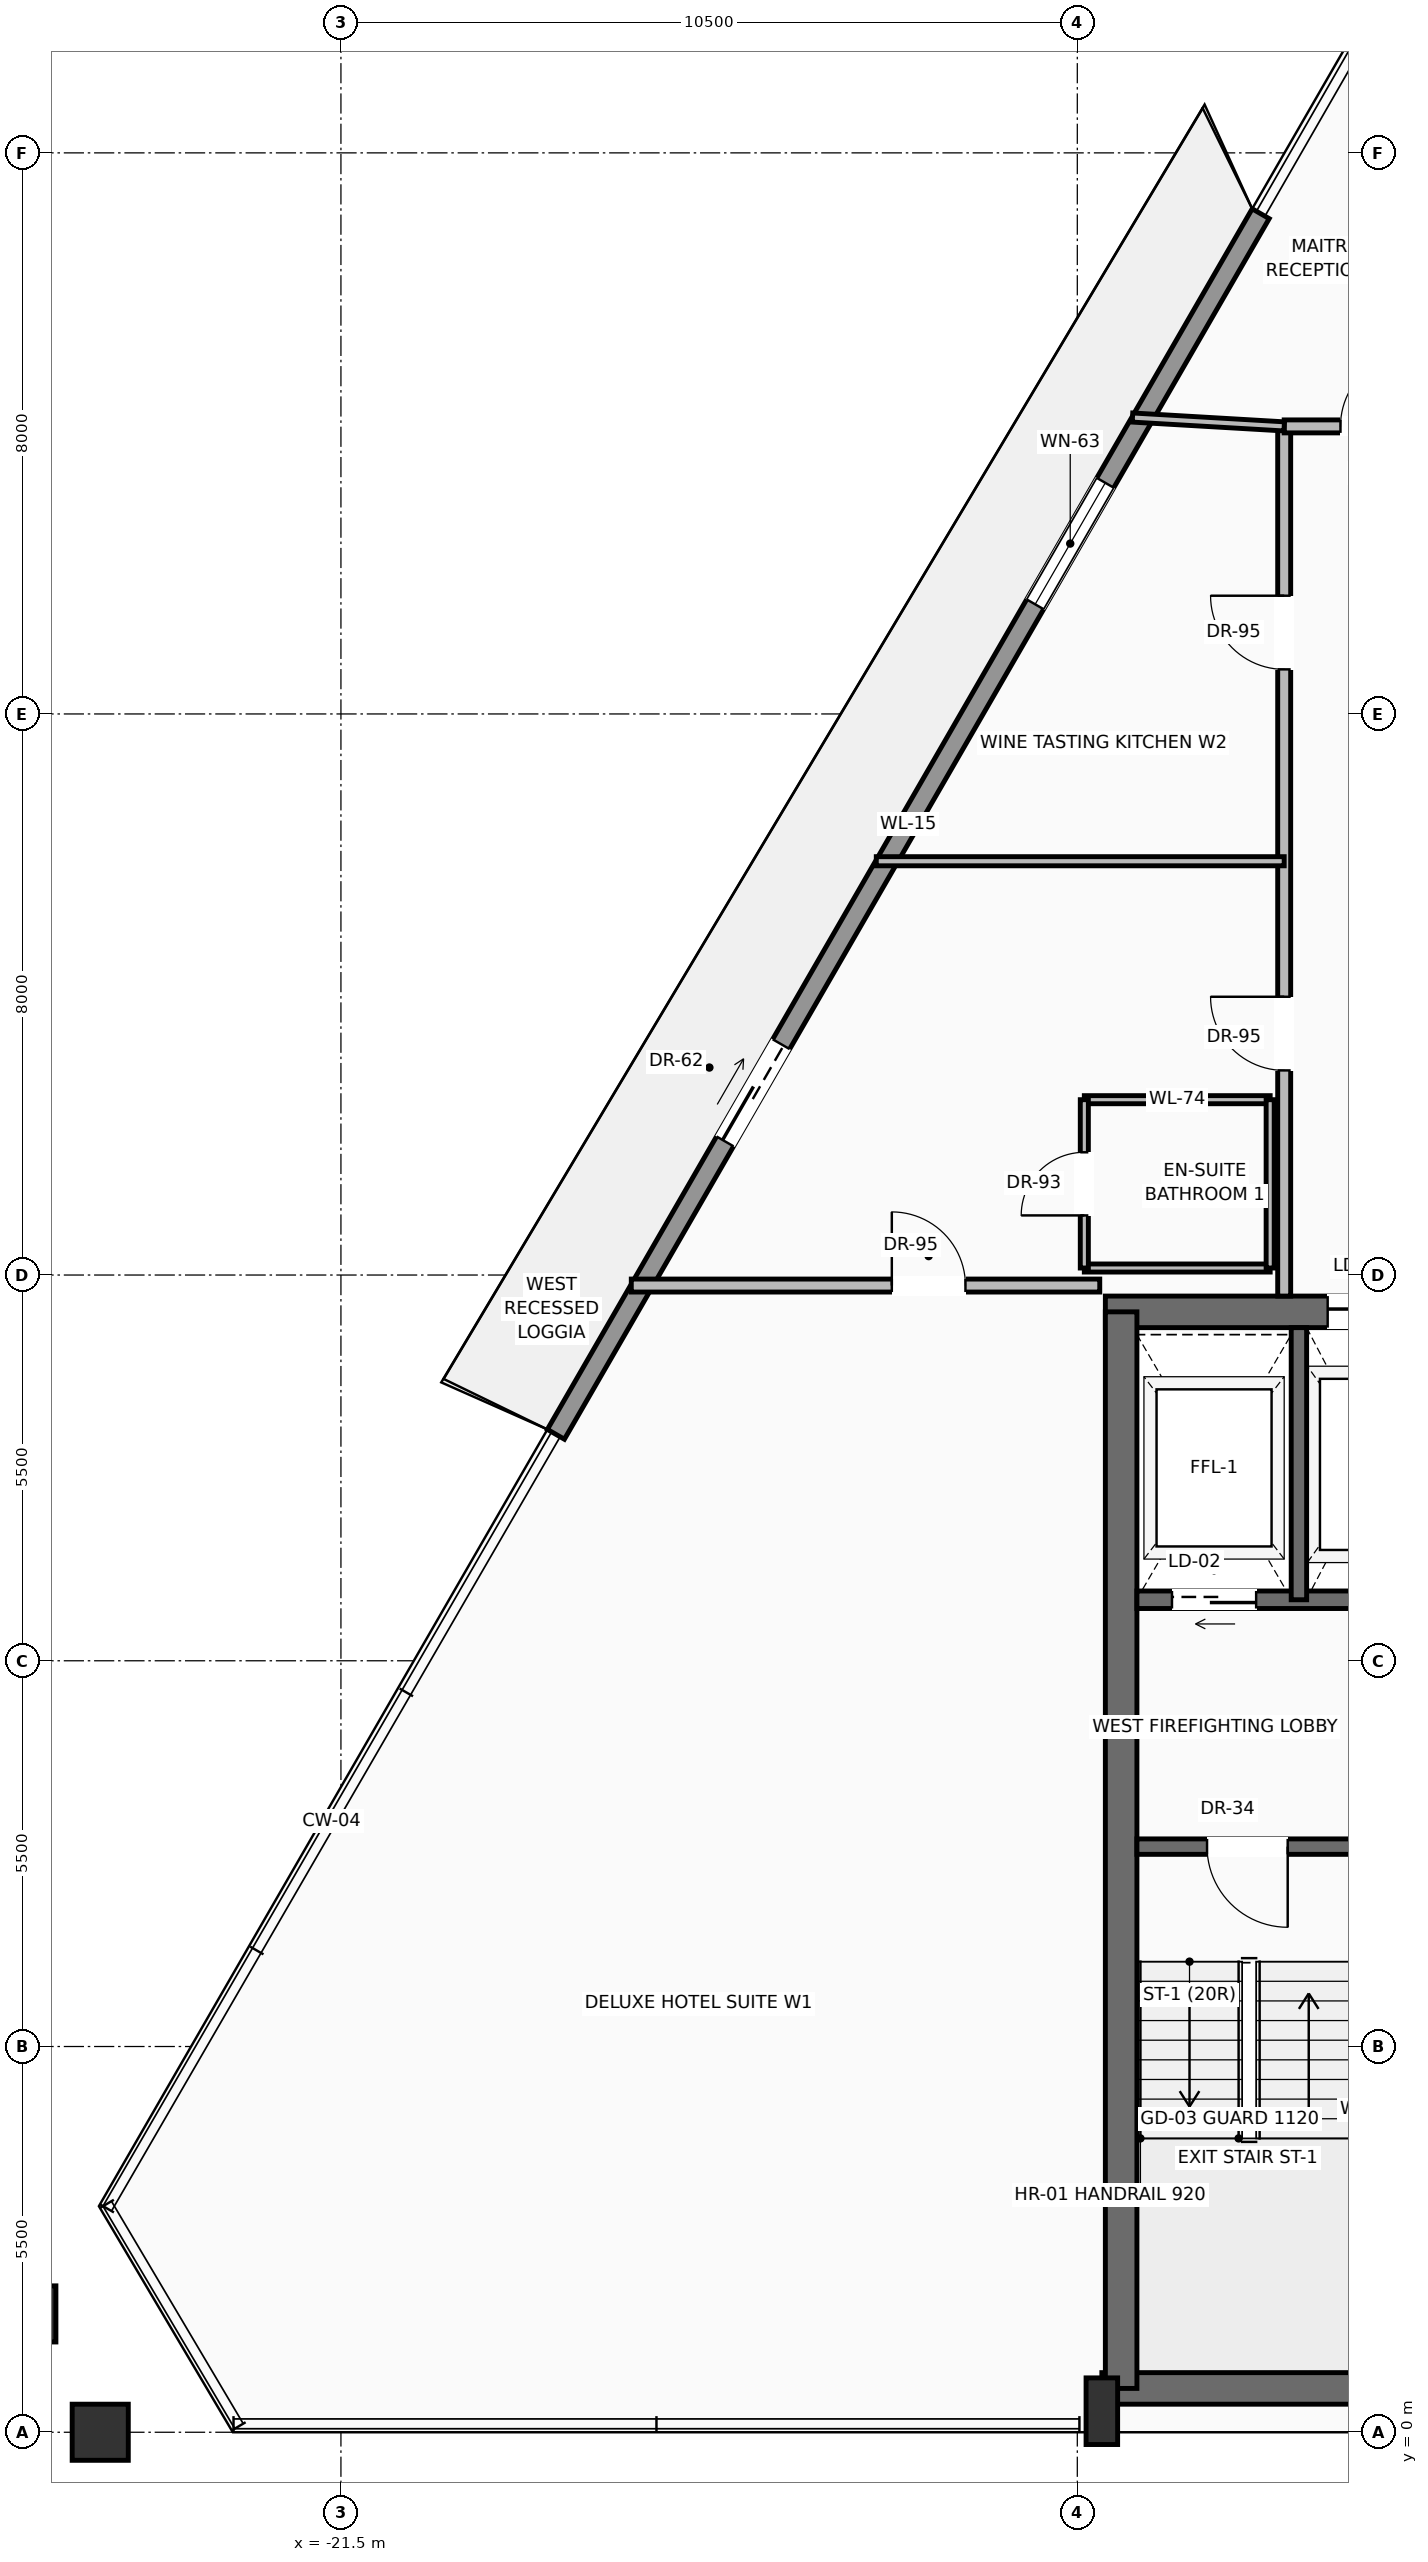
"""IFC4 building model, lengths in metres.
Left out: names, types, materials, properties, quantities, classifications, styles, units other than length and angle.
Written with IfcOpenShell. Run it as: python <this file> out.ifc"""

import sys

from ifc_helpers import new_model, si_unit, direction, frame, frame_2d, origin, origin_2d, place, context, subcontext, project, spatial, rectangle, hollow_rectangle, extrude, source, transform, mapped, element, fill, save


model = new_model("IFC4")
c1 = context("Model", 3, precision=1e-05, world=origin(), true_north=direction((0.0, 1.0)))
c2 = subcontext(c1, "Body", "Model", "MODEL_VIEW")
j1 = project(units=[si_unit("LENGTHUNIT", "METRE"), si_unit("PLANEANGLEUNIT", "RADIAN")], contexts=[c1])
p1 = place(None, origin())
s1 = spatial("IfcSite", under=j1, at=p1, CompositionType="ELEMENT")
p2 = place(p1, origin())
s2 = spatial("IfcBuilding", under=s1, at=p2, CompositionType="ELEMENT")
p3 = place(p2, frame((0.0, 0.0, 276.45)))
s3 = spatial("IfcBuildingStorey", under=s2, at=p3, CompositionType="ELEMENT", Elevation=276.45)
p4 = place(p3, frame((-10.65, 0.625, 0.0), z_axis=(0.0, 0.0, 1.0), x_axis=(1.0, 0.0, 0.0)))
e1 = element("IfcWall", 1, at=p4, inside=s3, PredefinedType="SHEAR", context=c2, shape_type="SweptSolid", body=[
    extrude(rectangle(XDim=21.3, YDim=0.45, at=frame_2d((10.65, 0.0))), origin(), (0.0, 0.0, 1.0), 3.24),
])
p5 = place(p3, frame((-10.6, 15.975, 0.0), z_axis=(0.0, 0.0, 1.0), x_axis=(1.0, 0.0, 0.0)))
e2 = element("IfcWall", 2, at=p5, inside=s3, PredefinedType="SHEAR", context=c2, shape_type="SweptSolid", body=[
    extrude(rectangle(XDim=21.2, YDim=0.45, at=frame_2d((10.6, 0.0))), origin(), (0.0, 0.0, 1.0), 3.24),
])
p6 = place(p5, frame((3.17, 0.0, 0.0)))
e3 = element("IfcOpeningElement", 3, at=p6, cuts=e2, PredefinedType="OPENING", context=c2, shape_type="SweptSolid", body=[
    extrude(rectangle(XDim=1.3, YDim=2.3, at=frame_2d((0.65, 1.15))), frame((0.0, 0.235, 0.0), z_axis=(0.0, -1.0, 0.0), x_axis=(1.0, 0.0, 0.0)), (0.0, 0.0, 1.0), 0.47),
])
p7 = place(p5, frame((9.6, 0.0, 0.0)))
e4 = element("IfcOpeningElement", 4, at=p7, cuts=e2, PredefinedType="OPENING", context=c2, shape_type="SweptSolid", body=[
    extrude(rectangle(XDim=2.0, YDim=2.4, at=frame_2d((1.0, 1.2))), frame((0.0, 0.235, 0.0), z_axis=(0.0, -1.0, 0.0), x_axis=(1.0, 0.0, 0.0)), (0.0, 0.0, 1.0), 0.47),
])
p8 = place(p3, frame((-10.375, 0.625, 0.0), z_axis=(0.0, 0.0, 1.0), x_axis=(0.0, 1.0, 0.0)))
e5 = element("IfcWall", 5, at=p8, inside=s3, PredefinedType="SHEAR", context=c2, shape_type="SweptSolid", body=[
    extrude(rectangle(XDim=15.35, YDim=0.45, at=frame_2d((7.675, 0.0))), origin(), (0.0, 0.0, 1.0), 3.24),
])
m1 = source(origin(), c2, "Body", "SweptSolid", [
    extrude(rectangle(XDim=0.45, YDim=0.95, at=origin_2d()), origin(), (0.0, 0.0, 1.0), 3.45),
])
p9 = place(p3, frame((-10.65, 0.3, 0.0), z_axis=(0.0, 0.0, 1.0), x_axis=(1.0, 0.0, 0.0)))
e6 = element("IfcColumn", 6, at=p9, inside=s3, PredefinedType="PILASTER", context=c2, shape_type="MappedRepresentation", body=[
    mapped(m1, transform((0.0, 0.0, 0.0), scale=1.0)),
])
m2 = source(origin(), c2, "Body", "SweptSolid", [
    extrude(hollow_rectangle(XDim=0.8, YDim=0.8, WallThickness=0.04, at=origin_2d()), origin(), (0.0, 0.0, 1.0), 3.441),
])
p10 = place(p3, frame((-24.932, 0.0, 0.004), z_axis=(0.001206100577, 0.0, 0.99999927266), x_axis=(1.0, 0.0, 0.0)))
e7 = element("IfcColumn", 7, at=p10, inside=s3, PredefinedType="COLUMN", context=c2, shape_type="MappedRepresentation", body=[
    mapped(m2, transform((0.0, 0.0, 0.0), scale=1.0)),
])
m3 = source(origin(), c2, "Body", "SweptSolid", [
    extrude(hollow_rectangle(XDim=0.8, YDim=0.8, WallThickness=0.04, at=origin_2d()), origin(), (0.0, 0.0, 1.0), 3.442),
])
p11 = place(p3, frame((-25.964, 1.687, 0.004), z_axis=(0.012484033349, -0.016456225778, 0.999786648013), x_axis=(0.796691270902, 0.604386481374, 0.0)))
e8 = element("IfcColumn", 8, at=p11, inside=s3, PredefinedType="COLUMN", context=c2, shape_type="MappedRepresentation", body=[
    mapped(m3, transform((0.0, 0.0, 0.0), scale=1.0)),
])
p12 = place(p3, frame((-18.435, 14.229, 0.0), z_axis=(0.0, 0.0, 1.0), x_axis=(0.50006385546, 0.865988533678, 0.0)))
e9 = element("IfcWall", 9, at=p12, inside=s3, PredefinedType="SOLIDWALL", context=c2, shape_type="SweptSolid", body=[
    extrude(rectangle(XDim=20.097, YDim=0.28, at=frame_2d((10.048, 0.0))), origin(), (0.0, 0.0, 1.0), 2.82),
])
p13 = place(p12, frame((4.823, 0.0, 0.0)))
e10 = element("IfcOpeningElement", 10, at=p13, cuts=e9, PredefinedType="OPENING", context=c2, shape_type="SweptSolid", body=[
    extrude(rectangle(XDim=1.6, YDim=2.35, at=frame_2d((0.8, 1.175))), frame((0.0, 0.15, 0.0), z_axis=(0.0, -1.0, 0.0), x_axis=(1.0, 0.0, 0.0)), (0.0, 0.0, 1.0), 0.3),
])
p14 = place(p12, frame((13.666, 0.0, 0.9)))
e11 = element("IfcOpeningElement", 11, at=p14, cuts=e9, PredefinedType="OPENING", context=c2, shape_type="SweptSolid", body=[
    extrude(rectangle(XDim=2.0, YDim=1.75, at=frame_2d((1.0, 0.875))), frame((0.0, 0.15, 0.0), z_axis=(0.0, -1.0, 0.0), x_axis=(1.0, 0.0, 0.0)), (0.0, 0.0, 1.0), 0.3),
])
p15 = place(p3, frame((-5.5, 8.35, 0.0), z_axis=(0.0, 0.0, 1.0), x_axis=(-1.0, 0.0, 0.0)))
e12 = element("IfcWall", 12, at=p15, inside=s3, PredefinedType="SOLIDWALL", context=c2, shape_type="SweptSolid", body=[
    extrude(rectangle(XDim=4.65, YDim=0.22, at=frame_2d((2.325, 0.0))), origin(), (0.0, 0.0, 1.0), 3.24),
])
p16 = place(p15, frame((2.5, 0.0, 0.0)))
e13 = element("IfcOpeningElement", 13, at=p16, cuts=e12, PredefinedType="OPENING", context=c2, shape_type="SweptSolid", body=[
    extrude(rectangle(XDim=1.15, YDim=2.2, at=frame_2d((0.575, 1.1))), frame((0.0, 0.12, 0.0), z_axis=(0.0, -1.0, 0.0), x_axis=(1.0, 0.0, 0.0)), (0.0, 0.0, 1.0), 0.24),
])
p17 = place(p3, frame((-5.5, 11.87, 0.0), z_axis=(0.0, 0.0, 1.0), x_axis=(-1.0, 0.0, 0.0)))
e14 = element("IfcWall", 14, at=p17, inside=s3, PredefinedType="SOLIDWALL", context=c2, shape_type="SweptSolid", body=[
    extrude(rectangle(XDim=4.65, YDim=0.25, at=frame_2d((2.325, 0.0))), origin(), (0.0, 0.0, 1.0), 3.24),
])
p18 = place(p17, frame((2.95, 0.0, 0.0)))
e15 = element("IfcOpeningElement", 15, at=p18, cuts=e14, PredefinedType="OPENING", context=c2, shape_type="SweptSolid", body=[
    extrude(rectangle(XDim=1.2, YDim=2.25, at=frame_2d((0.6, 1.125))), frame((0.0, 0.135, 0.0), z_axis=(0.0, -1.0, 0.0), x_axis=(1.0, 0.0, 0.0)), (0.0, 0.0, 1.0), 0.27),
])
p19 = place(p3, frame((-7.84, 11.87, 0.0), z_axis=(0.0, 0.0, 1.0), x_axis=(0.0, 1.0, 0.0)))
e16 = element("IfcWall", 16, at=p19, inside=s3, PredefinedType="SOLIDWALL", context=c2, shape_type="SweptSolid", body=[
    extrude(rectangle(XDim=3.88, YDim=0.22, at=frame_2d((1.94, 0.0))), origin(), (0.0, 0.0, 1.0), 3.24),
])
p20 = place(p3, frame((-8.05, 16.2, 0.0), z_axis=(0.0, 0.0, 1.0), x_axis=(0.0, 1.0, 0.0)))
e17 = element("IfcWall", 17, at=p20, inside=s3, PredefinedType="PARTITIONING", context=c2, shape_type="SweptSolid", body=[
    extrude(rectangle(XDim=12.4, YDim=0.185, at=frame_2d((6.2, 0.0))), origin(), (0.0, 0.0, 1.0), 3.232),
])
p21 = place(p20, frame((3.218, 0.0, 0.0)))
e18 = element("IfcOpeningElement", 18, at=p21, cuts=e17, PredefinedType="OPENING", context=c2, shape_type="SweptSolid", body=[
    extrude(rectangle(XDim=1.05, YDim=2.25, at=frame_2d((0.525, 1.125))), frame((0.0, 0.103, 0.0), z_axis=(0.0, -1.0, 0.0), x_axis=(1.0, 0.0, 0.0)), (0.0, 0.0, 1.0), 0.205),
])
p22 = place(p20, frame((8.936, 0.0, 0.0)))
e19 = element("IfcOpeningElement", 19, at=p22, cuts=e17, PredefinedType="OPENING", context=c2, shape_type="SweptSolid", body=[
    extrude(rectangle(XDim=1.05, YDim=2.25, at=frame_2d((0.525, 1.125))), frame((0.0, 0.103, 0.0), z_axis=(0.0, -1.0, 0.0), x_axis=(1.0, 0.0, 0.0)), (0.0, 0.0, 1.0), 0.205),
])
p23 = place(p3, frame((-8.05, 28.6, 0.0), z_axis=(0.0, 0.0, 1.0), x_axis=(1.0, 0.0, 0.0)))
e20 = element("IfcWall", 20, at=p23, inside=s3, PredefinedType="PARTITIONING", context=c2, shape_type="SweptSolid", body=[
    extrude(rectangle(XDim=16.65, YDim=0.185, at=frame_2d((8.325, 0.0))), origin(), (0.0, 0.0, 1.0), 3.232),
])
p24 = place(p23, frame((3.248, 0.0, 0.0)))
e21 = element("IfcOpeningElement", 21, at=p24, cuts=e20, PredefinedType="OPENING", context=c2, shape_type="SweptSolid", body=[
    extrude(rectangle(XDim=1.05, YDim=2.25, at=frame_2d((0.525, 1.125))), frame((0.0, 0.103, 0.0), z_axis=(0.0, -1.0, 0.0), x_axis=(1.0, 0.0, 0.0)), (0.0, 0.0, 1.0), 0.205),
])
p25 = place(p23, frame((7.8, 0.0, 0.0)))
e22 = element("IfcOpeningElement", 22, at=p25, cuts=e20, PredefinedType="OPENING", context=c2, shape_type="SweptSolid", body=[
    extrude(rectangle(XDim=1.05, YDim=2.25, at=frame_2d((0.525, 1.125))), frame((0.0, 0.103, 0.0), z_axis=(0.0, -1.0, 0.0), x_axis=(1.0, 0.0, 0.0)), (0.0, 0.0, 1.0), 0.205),
])
p26 = place(p23, frame((11.802, 0.0, 0.0)))
e23 = element("IfcOpeningElement", 23, at=p26, cuts=e20, PredefinedType="OPENING", context=c2, shape_type="SweptSolid", body=[
    extrude(rectangle(XDim=1.05, YDim=2.25, at=frame_2d((0.525, 1.125))), frame((0.0, 0.103, 0.0), z_axis=(0.0, -1.0, 0.0), x_axis=(1.0, 0.0, 0.0)), (0.0, 0.0, 1.0), 0.205),
])
p27 = place(p23, frame((0.802, 0.0, 0.0)))
e24 = element("IfcOpeningElement", 24, at=p27, cuts=e20, PredefinedType="OPENING", context=c2, shape_type="SweptSolid", body=[
    extrude(rectangle(XDim=1.05, YDim=2.25, at=frame_2d((0.525, 1.125))), frame((0.0, 0.103, 0.0), z_axis=(0.0, -1.0, 0.0), x_axis=(1.0, 0.0, 0.0)), (0.0, 0.0, 1.0), 0.205),
])
p28 = place(p3, frame((-17.36, 16.35, 0.0), z_axis=(0.0, 0.0, 1.0), x_axis=(1.0, 0.0, 0.0)))
e25 = element("IfcWall", 25, at=p28, inside=s3, PredefinedType="PARTITIONING", context=c2, shape_type="SweptSolid", body=[
    extrude(rectangle(XDim=6.68, YDim=0.185, at=frame_2d((3.34, 0.0))), origin(), (0.0, 0.0, 1.0), 3.232),
])
p29 = place(p28, frame((3.715, 0.0, 0.0)))
e26 = element("IfcOpeningElement", 26, at=p29, cuts=e25, PredefinedType="OPENING", context=c2, shape_type="SweptSolid", body=[
    extrude(rectangle(XDim=1.05, YDim=2.25, at=frame_2d((0.525, 1.125))), frame((0.0, 0.103, 0.0), z_axis=(0.0, -1.0, 0.0), x_axis=(1.0, 0.0, 0.0)), (0.0, 0.0, 1.0), 0.205),
])
p30 = place(p3, frame((-10.213, 28.726, 0.0), z_axis=(0.0, 0.0, 1.0), x_axis=(0.998302231297, -0.058246501928, 0.0)))
e27 = element("IfcWall", 27, at=p30, inside=s3, PredefinedType="PARTITIONING", context=c2, shape_type="SweptSolid", body=[
    extrude(rectangle(XDim=2.167, YDim=0.13, at=frame_2d((1.083, 0.0))), origin(), (0.0, 0.0, 1.0), 3.232),
])
for number, where, z_axis, x_axis in (
    (28, (-10.9, 16.6, 0.0), (0.0, 0.0, 1.0), (1.0, 0.0, 0.0)),
    (29, (-10.9, 19.0, 0.0), (0.0, 0.0, 1.0), (1.0, 0.0, 0.0)),
):
    element("IfcWall", number, at=place(p3, frame(where, z_axis=z_axis, x_axis=x_axis)), inside=s3, PredefinedType="PARTITIONING", context=c2, shape_type="SweptSolid", body=[
        extrude(rectangle(XDim=2.65, YDim=0.115, at=frame_2d((1.325, 0.0))), origin(), (0.0, 0.0, 1.0), 3.232),
    ])
p31 = place(p3, frame((-10.9, 16.6, 0.0), z_axis=(0.0, 0.0, 1.0), x_axis=(0.0, 1.0, 0.0)))
e30 = element("IfcWall", 30, at=p31, inside=s3, PredefinedType="PARTITIONING", context=c2, shape_type="SweptSolid", body=[
    extrude(rectangle(XDim=2.4, YDim=0.115, at=frame_2d((1.2, 0.0))), origin(), (0.0, 0.0, 1.0), 3.232),
])
p32 = place(p31, frame((0.75, 0.0, 0.0)))
e31 = element("IfcOpeningElement", 31, at=p32, cuts=e30, PredefinedType="OPENING", context=c2, shape_type="SweptSolid", body=[
    extrude(rectangle(XDim=0.9, YDim=2.15, at=frame_2d((0.45, 1.075))), frame((0.0, 0.067, 0.0), z_axis=(0.0, -1.0, 0.0), x_axis=(1.0, 0.0, 0.0)), (0.0, 0.0, 1.0), 0.135),
])
p33 = place(p3, frame((-8.25, 16.6, 0.0), z_axis=(0.0, 0.0, 1.0), x_axis=(0.0, 1.0, 0.0)))
e32 = element("IfcWall", 32, at=p33, inside=s3, PredefinedType="PARTITIONING", context=c2, shape_type="SweptSolid", body=[
    extrude(rectangle(XDim=2.4, YDim=0.115, at=frame_2d((1.2, 0.0))), origin(), (0.0, 0.0, 1.0), 3.232),
])
p34 = place(p3, frame((-13.866, 22.4, 0.0), z_axis=(0.0, 0.0, 1.0), x_axis=(1.0, 0.0, 0.0)))
e33 = element("IfcWall", 33, at=p34, inside=s3, PredefinedType="PARTITIONING", context=c2, shape_type="SweptSolid", body=[
    extrude(rectangle(XDim=5.816, YDim=0.13, at=frame_2d((2.908, 0.0))), origin(), (0.0, 0.0, 1.0), 3.232),
])
m4 = source(origin(), c2, "Body", "SweptSolid", [
    extrude(rectangle(XDim=1.6, YDim=2.35, at=frame_2d((0.8, 1.175))), frame((0.0, 0.025, 0.0), z_axis=(0.0, -1.0, 0.0), x_axis=(1.0, 0.0, 0.0)), (0.0, 0.0, 1.0), 0.05),
])
p35 = place(p13, origin())
e34 = element("IfcDoor", 34, at=p35, inside=s3, OperationType="SLIDING_TO_LEFT", PredefinedType="DOOR", context=c2, shape_type="MappedRepresentation", body=[
    mapped(m4, transform((0.0, 0.0, 0.0), scale=1.0)),
])
fill(e10, e34)
m5 = source(origin(), c2, "Body", "SweptSolid", [
    extrude(rectangle(XDim=2.0, YDim=1.75, at=frame_2d((1.0, 0.875))), frame((0.0, 0.03, 0.0), z_axis=(0.0, -1.0, 0.0), x_axis=(1.0, 0.0, 0.0)), (0.0, 0.0, 1.0), 0.06),
])
p36 = place(p14, origin())
e35 = element("IfcWindow", 35, at=p36, inside=s3, PartitioningType="SINGLE_PANEL", PredefinedType="WINDOW", context=c2, shape_type="MappedRepresentation", body=[
    mapped(m5, transform((0.0, 0.0, 0.0), scale=1.0)),
])
fill(e11, e35)
m6 = source(origin(), c2, "Body", "SweptSolid", [
    extrude(rectangle(XDim=1.15, YDim=2.2, at=frame_2d((0.575, 1.1))), frame((0.0, 0.025, 0.0), z_axis=(0.0, -1.0, 0.0), x_axis=(1.0, 0.0, 0.0)), (0.0, 0.0, 1.0), 0.05),
])
p37 = place(p16, origin())
e36 = element("IfcDoor", 36, at=p37, inside=s3, OperationType="SINGLE_SWING_LEFT", PredefinedType="DOOR", context=c2, shape_type="MappedRepresentation", body=[
    mapped(m6, transform((0.0, 0.0, 0.0), scale=1.0)),
])
fill(e13, e36)
m7 = source(origin(), c2, "Body", "SweptSolid", [
    extrude(rectangle(XDim=1.2, YDim=2.25, at=frame_2d((0.6, 1.125))), frame((0.0, 0.025, 0.0), z_axis=(0.0, -1.0, 0.0), x_axis=(1.0, 0.0, 0.0)), (0.0, 0.0, 1.0), 0.05),
])
p38 = place(p18, origin())
e37 = element("IfcDoor", 37, at=p38, inside=s3, OperationType="SLIDING_TO_LEFT", PredefinedType="DOOR", context=c2, shape_type="MappedRepresentation", body=[
    mapped(m7, transform((0.0, 0.0, 0.0), scale=1.0)),
])
fill(e15, e37)
m8 = source(origin(), c2, "Body", "SweptSolid", [
    extrude(rectangle(XDim=1.3, YDim=2.3, at=frame_2d((0.65, 1.15))), frame((0.0, 0.025, 0.0), z_axis=(0.0, -1.0, 0.0), x_axis=(1.0, 0.0, 0.0)), (0.0, 0.0, 1.0), 0.05),
])
p39 = place(p6, origin())
e38 = element("IfcDoor", 38, at=p39, inside=s3, OperationType="SLIDING_TO_RIGHT", PredefinedType="DOOR", context=c2, shape_type="MappedRepresentation", body=[
    mapped(m8, transform((0.0, 0.0, 0.0), scale=1.0)),
])
fill(e3, e38)
m9 = source(origin(), c2, "Body", "SweptSolid", [
    extrude(rectangle(XDim=1.05, YDim=2.25, at=frame_2d((0.525, 1.125))), frame((0.0, 0.025, 0.0), z_axis=(0.0, -1.0, 0.0), x_axis=(1.0, 0.0, 0.0)), (0.0, 0.0, 1.0), 0.05),
])
p40 = place(p29, origin())
e39 = element("IfcDoor", 39, at=p40, inside=s3, OperationType="SINGLE_SWING_LEFT", PredefinedType="DOOR", context=c2, shape_type="MappedRepresentation", body=[
    mapped(m9, transform((0.0, 0.0, 0.0), scale=1.0)),
])
fill(e26, e39)
p41 = place(p21, origin())
e40 = element("IfcDoor", 40, at=p41, inside=s3, OperationType="SINGLE_SWING_RIGHT", PredefinedType="DOOR", context=c2, shape_type="MappedRepresentation", body=[
    mapped(m9, transform((0.0, 0.0, 0.0), scale=1.0)),
])
fill(e18, e40)
m10 = source(origin(), c2, "Body", "SweptSolid", [
    extrude(rectangle(XDim=0.9, YDim=2.15, at=frame_2d((0.45, 1.075))), frame((0.0, 0.025, 0.0), z_axis=(0.0, -1.0, 0.0), x_axis=(1.0, 0.0, 0.0)), (0.0, 0.0, 1.0), 0.05),
])
p42 = place(p32, origin())
e41 = element("IfcDoor", 41, at=p42, inside=s3, OperationType="SINGLE_SWING_LEFT", PredefinedType="DOOR", context=c2, shape_type="MappedRepresentation", body=[
    mapped(m10, transform((0.0, 0.0, 0.0), scale=1.0)),
])
fill(e31, e41)
p43 = place(p22, origin())
e42 = element("IfcDoor", 42, at=p43, inside=s3, OperationType="SINGLE_SWING_RIGHT", PredefinedType="DOOR", context=c2, shape_type="MappedRepresentation", body=[
    mapped(m9, transform((0.0, 0.0, 0.0), scale=1.0)),
])
fill(e19, e42)
p44 = place(p27, origin())
e43 = element("IfcDoor", 43, at=p44, inside=s3, OperationType="SINGLE_SWING_RIGHT", PredefinedType="DOOR", context=c2, shape_type="MappedRepresentation", body=[
    mapped(m9, transform((0.0, 0.0, 0.0), scale=1.0)),
])
fill(e24, e43)
save(model, sys.argv[1])
